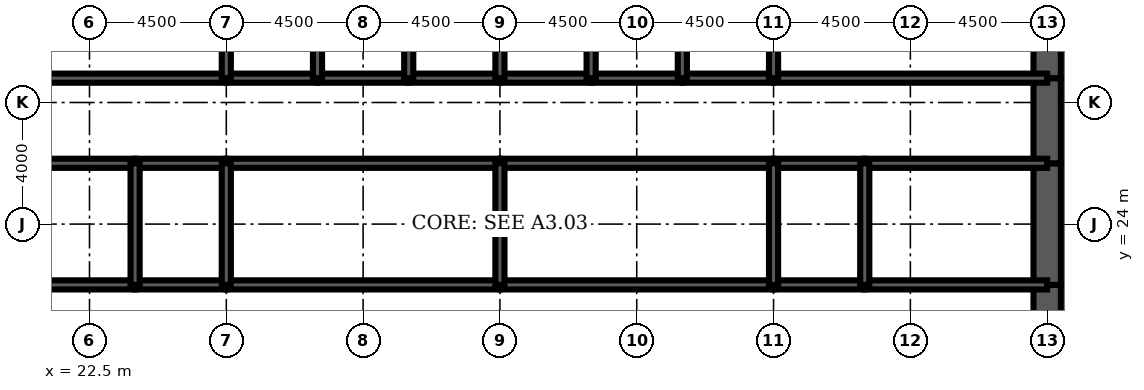
"""IFC4 building model, lengths in metres.
Left out: names, types, materials, properties, quantities, classifications, styles, units other than length and angle.
Written with IfcOpenShell. Run it as: python <this file> out.ifc"""

import sys

from ifc_helpers import new_model, si_unit, direction, frame, frame_2d, origin, place, context, subcontext, project, spatial, rectangle, extrude, element, fill, save


model = new_model("IFC4")
c1 = context("Model", 3, precision=1e-05, world=origin(), true_north=direction((0.0, 1.0)))
c2 = subcontext(c1, "Body", "Model", "MODEL_VIEW")
j1 = project(units=[si_unit("LENGTHUNIT", "METRE"), si_unit("PLANEANGLEUNIT", "RADIAN")], contexts=[c1])
p1 = place(None, origin())
s1 = spatial("IfcSite", under=j1, at=p1, CompositionType="ELEMENT")
p2 = place(p1, origin())
s2 = spatial("IfcBuilding", under=s1, at=p2, CompositionType="ELEMENT")
p3 = place(p2, frame((0.0, 0.0, 6.0)))
s3 = spatial("IfcBuildingStorey", under=s2, at=p3, CompositionType="ELEMENT", Elevation=6.0)
p4 = place(p3, frame((54.0, 19.2, 0.0), z_axis=(0.0, 0.0, 1.0), x_axis=(0.0, 1.0, 0.0)))
e1 = element("IfcWall", 1, at=p4, inside=s3, PredefinedType="SHEAR", context=c2, shape_type="SweptSolid", body=[
    extrude(rectangle(XDim=2.8, YDim=0.9, at=frame_2d((1.4, 0.0))), origin(), (0.0, 0.0, 1.0), 7.0),
])
p5 = place(p4, frame((0.4, 0.0, 0.0)))
e2 = element("IfcOpeningElement", 2, at=p5, cuts=e1, PredefinedType="OPENING", context=c2, shape_type="SweptSolid", body=[
    extrude(rectangle(XDim=1.8, YDim=2.1, at=frame_2d((0.9, 1.05))), frame((0.0, 0.46, 0.0), z_axis=(0.0, -1.0, 0.0), x_axis=(1.0, 0.0, 0.0)), (0.0, 0.0, 1.0), 0.92),
])
p6 = place(p3, frame((54.0, 22.0, 0.0), z_axis=(0.0, 0.0, 1.0), x_axis=(0.0, 1.0, 0.0)))
e3 = element("IfcWall", 3, at=p6, inside=s3, PredefinedType="SHEAR", context=c2, shape_type="SweptSolid", body=[
    extrude(rectangle(XDim=4.0, YDim=0.9, at=frame_2d((2.0, 0.0))), origin(), (0.0, 0.0, 1.0), 7.0),
])
p7 = place(p3, frame((54.0, 26.0, 0.0), z_axis=(0.0, 0.0, 1.0), x_axis=(0.0, 1.0, 0.0)))
e4 = element("IfcWall", 4, at=p7, inside=s3, PredefinedType="SHEAR", context=c2, shape_type="SweptSolid", body=[
    extrude(rectangle(XDim=2.8, YDim=0.9, at=frame_2d((1.4, 0.0))), origin(), (0.0, 0.0, 1.0), 7.0),
])
p8 = place(p7, frame((0.6, 0.0, 0.0)))
e5 = element("IfcOpeningElement", 5, at=p8, cuts=e4, PredefinedType="OPENING", context=c2, shape_type="SweptSolid", body=[
    extrude(rectangle(XDim=1.8, YDim=2.1, at=frame_2d((0.9, 1.05))), frame((0.0, 0.46, 0.0), z_axis=(0.0, -1.0, 0.0), x_axis=(1.0, 0.0, 0.0)), (0.0, 0.0, 1.0), 0.92),
])
p9 = place(p3, frame((54.0, 28.8, 0.0), z_axis=(0.0, 0.0, 1.0), x_axis=(0.0, 1.0, 0.0)))
e6 = element("IfcWall", 6, at=p9, inside=s3, PredefinedType="SHEAR", context=c2, shape_type="SweptSolid", body=[
    extrude(rectangle(XDim=3.2, YDim=0.9, at=frame_2d((1.6, 0.0))), origin(), (0.0, 0.0, 1.0), 7.0),
])
p10 = place(p3, frame((18.0, 28.8, 0.0), z_axis=(0.0, 0.0, 1.0), x_axis=(1.0, 0.0, 0.0)))
e7 = element("IfcWall", 7, at=p10, inside=s3, PredefinedType="SOLIDWALL", context=c2, shape_type="SweptSolid", body=[
    extrude(rectangle(XDim=9.0, YDim=0.3, at=frame_2d((4.5, 0.0))), origin(), (0.0, 0.0, 1.0), 7.0),
])
p11 = place(p10, frame((0.65, 0.0, 0.0)))
e8 = element("IfcOpeningElement", 8, at=p11, cuts=e7, PredefinedType="OPENING", context=c2, shape_type="SweptSolid", body=[
    extrude(rectangle(XDim=1.0, YDim=2.1, at=frame_2d((0.5, 1.05))), frame((0.0, 0.16, 0.0), z_axis=(0.0, -1.0, 0.0), x_axis=(1.0, 0.0, 0.0)), (0.0, 0.0, 1.0), 0.32),
])
p12 = place(p3, frame((27.0, 28.8, 0.0), z_axis=(0.0, 0.0, 1.0), x_axis=(1.0, 0.0, 0.0)))
e9 = element("IfcWall", 9, at=p12, inside=s3, PredefinedType="SOLIDWALL", context=c2, shape_type="SweptSolid", body=[
    extrude(rectangle(XDim=3.0, YDim=0.3, at=frame_2d((1.5, 0.0))), origin(), (0.0, 0.0, 1.0), 7.0),
])
p13 = place(p12, frame((0.95, 0.0, 0.0)))
e10 = element("IfcOpeningElement", 10, at=p13, cuts=e9, PredefinedType="OPENING", context=c2, shape_type="SweptSolid", body=[
    extrude(rectangle(XDim=1.1, YDim=2.2, at=frame_2d((0.55, 1.1))), frame((0.0, 0.16, 0.0), z_axis=(0.0, -1.0, 0.0), x_axis=(1.0, 0.0, 0.0)), (0.0, 0.0, 1.0), 0.32),
])
p14 = place(p3, frame((30.0, 28.8, 0.0), z_axis=(0.0, 0.0, 1.0), x_axis=(1.0, 0.0, 0.0)))
e11 = element("IfcWall", 11, at=p14, inside=s3, PredefinedType="SOLIDWALL", context=c2, shape_type="SweptSolid", body=[
    extrude(rectangle(XDim=3.0, YDim=0.3, at=frame_2d((1.5, 0.0))), origin(), (0.0, 0.0, 1.0), 7.0),
])
p15 = place(p14, frame((0.95, 0.0, 0.0)))
e12 = element("IfcOpeningElement", 12, at=p15, cuts=e11, PredefinedType="OPENING", context=c2, shape_type="SweptSolid", body=[
    extrude(rectangle(XDim=1.1, YDim=2.2, at=frame_2d((0.55, 1.1))), frame((0.0, 0.16, 0.0), z_axis=(0.0, -1.0, 0.0), x_axis=(1.0, 0.0, 0.0)), (0.0, 0.0, 1.0), 0.32),
])
p16 = place(p3, frame((33.0, 28.8, 0.0), z_axis=(0.0, 0.0, 1.0), x_axis=(1.0, 0.0, 0.0)))
e13 = element("IfcWall", 13, at=p16, inside=s3, PredefinedType="SOLIDWALL", context=c2, shape_type="SweptSolid", body=[
    extrude(rectangle(XDim=3.0, YDim=0.3, at=frame_2d((1.5, 0.0))), origin(), (0.0, 0.0, 1.0), 7.0),
])
p17 = place(p16, frame((0.95, 0.0, 0.0)))
e14 = element("IfcOpeningElement", 14, at=p17, cuts=e13, PredefinedType="OPENING", context=c2, shape_type="SweptSolid", body=[
    extrude(rectangle(XDim=1.1, YDim=2.2, at=frame_2d((0.55, 1.1))), frame((0.0, 0.16, 0.0), z_axis=(0.0, -1.0, 0.0), x_axis=(1.0, 0.0, 0.0)), (0.0, 0.0, 1.0), 0.32),
])
for number, where, z_axis, x_axis in (
    (15, (36.0, 28.8, 0.0), (0.0, 0.0, 1.0), (1.0, 0.0, 0.0)),
    (16, (39.0, 28.8, 0.0), (0.0, 0.0, 1.0), (1.0, 0.0, 0.0)),
):
    element("IfcWall", number, at=place(p3, frame(where, z_axis=z_axis, x_axis=x_axis)), inside=s3, PredefinedType="SOLIDWALL", context=c2, shape_type="SweptSolid", body=[
        extrude(rectangle(XDim=3.0, YDim=0.3, at=frame_2d((1.5, 0.0))), origin(), (0.0, 0.0, 1.0), 7.0),
    ])
p18 = place(p3, frame((42.0, 28.8, 0.0), z_axis=(0.0, 0.0, 1.0), x_axis=(1.0, 0.0, 0.0)))
e17 = element("IfcWall", 17, at=p18, inside=s3, PredefinedType="SOLIDWALL", context=c2, shape_type="SweptSolid", body=[
    extrude(rectangle(XDim=3.0, YDim=0.3, at=frame_2d((1.5, 0.0))), origin(), (0.0, 0.0, 1.0), 7.0),
])
p19 = place(p18, frame((0.95, 0.0, 0.0)))
e18 = element("IfcOpeningElement", 18, at=p19, cuts=e17, PredefinedType="OPENING", context=c2, shape_type="SweptSolid", body=[
    extrude(rectangle(XDim=1.1, YDim=2.2, at=frame_2d((0.55, 1.1))), frame((0.0, 0.16, 0.0), z_axis=(0.0, -1.0, 0.0), x_axis=(1.0, 0.0, 0.0)), (0.0, 0.0, 1.0), 0.32),
])
p20 = place(p3, frame((45.0, 28.8, 0.0), z_axis=(0.0, 0.0, 1.0), x_axis=(1.0, 0.0, 0.0)))
e19 = element("IfcWall", 19, at=p20, inside=s3, PredefinedType="SOLIDWALL", context=c2, shape_type="SweptSolid", body=[
    extrude(rectangle(XDim=9.0, YDim=0.3, at=frame_2d((4.5, 0.0))), origin(), (0.0, 0.0, 1.0), 7.0),
])
p21 = place(p20, frame((7.35, 0.0, 0.0)))
e20 = element("IfcOpeningElement", 20, at=p21, cuts=e19, PredefinedType="OPENING", context=c2, shape_type="SweptSolid", body=[
    extrude(rectangle(XDim=1.0, YDim=2.1, at=frame_2d((0.5, 1.05))), frame((0.0, 0.16, 0.0), z_axis=(0.0, -1.0, 0.0), x_axis=(1.0, 0.0, 0.0)), (0.0, 0.0, 1.0), 0.32),
])
p22 = place(p3, frame((18.0, 22.0, 0.0), z_axis=(0.0, 0.0, 1.0), x_axis=(1.0, 0.0, 0.0)))
e21 = element("IfcWall", 21, at=p22, inside=s3, PredefinedType="SOLIDWALL", context=c2, shape_type="SweptSolid", body=[
    extrude(rectangle(XDim=6.0, YDim=0.3, at=frame_2d((3.0, 0.0))), origin(), (0.0, 0.0, 1.0), 7.0),
])
p23 = place(p22, frame((4.4, 0.0, 0.0)))
e22 = element("IfcOpeningElement", 22, at=p23, cuts=e21, PredefinedType="OPENING", context=c2, shape_type="SweptSolid", body=[
    extrude(rectangle(XDim=1.0, YDim=2.1, at=frame_2d((0.5, 1.05))), frame((0.0, 0.16, 0.0), z_axis=(0.0, -1.0, 0.0), x_axis=(1.0, 0.0, 0.0)), (0.0, 0.0, 1.0), 0.32),
])
p24 = place(p22, frame((0.7, 0.0, 0.0)))
e23 = element("IfcOpeningElement", 23, at=p24, cuts=e21, PredefinedType="OPENING", context=c2, shape_type="SweptSolid", body=[
    extrude(rectangle(XDim=1.0, YDim=2.1, at=frame_2d((0.5, 1.05))), frame((0.0, 0.16, 0.0), z_axis=(0.0, -1.0, 0.0), x_axis=(1.0, 0.0, 0.0)), (0.0, 0.0, 1.0), 0.32),
])
p25 = place(p3, frame((24.0, 22.0, 0.0), z_axis=(0.0, 0.0, 1.0), x_axis=(1.0, 0.0, 0.0)))
e24 = element("IfcWall", 24, at=p25, inside=s3, PredefinedType="SOLIDWALL", context=c2, shape_type="SweptSolid", body=[
    extrude(rectangle(XDim=3.0, YDim=0.3, at=frame_2d((1.5, 0.0))), origin(), (0.0, 0.0, 1.0), 7.0),
])
p26 = place(p25, frame((1.0, 0.0, 0.0)))
e25 = element("IfcOpeningElement", 25, at=p26, cuts=e24, PredefinedType="OPENING", context=c2, shape_type="SweptSolid", body=[
    extrude(rectangle(XDim=1.0, YDim=2.1, at=frame_2d((0.5, 1.05))), frame((0.0, 0.16, 0.0), z_axis=(0.0, -1.0, 0.0), x_axis=(1.0, 0.0, 0.0)), (0.0, 0.0, 1.0), 0.32),
])
p27 = place(p3, frame((27.0, 22.0, 0.0), z_axis=(0.0, 0.0, 1.0), x_axis=(1.0, 0.0, 0.0)))
e26 = element("IfcWall", 26, at=p27, inside=s3, PredefinedType="SOLIDWALL", context=c2, shape_type="SweptSolid", body=[
    extrude(rectangle(XDim=9.0, YDim=0.3, at=frame_2d((4.5, 0.0))), origin(), (0.0, 0.0, 1.0), 7.0),
])
p28 = place(p27, frame((4.0, 0.0, 0.0)))
e27 = element("IfcOpeningElement", 27, at=p28, cuts=e26, PredefinedType="OPENING", context=c2, shape_type="SweptSolid", body=[
    extrude(rectangle(XDim=1.0, YDim=2.1, at=frame_2d((0.5, 1.05))), frame((0.0, 0.16, 0.0), z_axis=(0.0, -1.0, 0.0), x_axis=(1.0, 0.0, 0.0)), (0.0, 0.0, 1.0), 0.32),
])
p29 = place(p3, frame((36.0, 22.0, 0.0), z_axis=(0.0, 0.0, 1.0), x_axis=(1.0, 0.0, 0.0)))
e28 = element("IfcWall", 28, at=p29, inside=s3, PredefinedType="SOLIDWALL", context=c2, shape_type="SweptSolid", body=[
    extrude(rectangle(XDim=9.0, YDim=0.3, at=frame_2d((4.5, 0.0))), origin(), (0.0, 0.0, 1.0), 7.0),
])
p30 = place(p29, frame((4.0, 0.0, 0.0)))
e29 = element("IfcOpeningElement", 29, at=p30, cuts=e28, PredefinedType="OPENING", context=c2, shape_type="SweptSolid", body=[
    extrude(rectangle(XDim=1.0, YDim=2.1, at=frame_2d((0.5, 1.05))), frame((0.0, 0.16, 0.0), z_axis=(0.0, -1.0, 0.0), x_axis=(1.0, 0.0, 0.0)), (0.0, 0.0, 1.0), 0.32),
])
p31 = place(p3, frame((45.0, 22.0, 0.0), z_axis=(0.0, 0.0, 1.0), x_axis=(1.0, 0.0, 0.0)))
e30 = element("IfcWall", 30, at=p31, inside=s3, PredefinedType="SOLIDWALL", context=c2, shape_type="SweptSolid", body=[
    extrude(rectangle(XDim=3.0, YDim=0.3, at=frame_2d((1.5, 0.0))), origin(), (0.0, 0.0, 1.0), 7.0),
])
p32 = place(p31, frame((1.0, 0.0, 0.0)))
e31 = element("IfcOpeningElement", 31, at=p32, cuts=e30, PredefinedType="OPENING", context=c2, shape_type="SweptSolid", body=[
    extrude(rectangle(XDim=1.0, YDim=2.1, at=frame_2d((0.5, 1.05))), frame((0.0, 0.16, 0.0), z_axis=(0.0, -1.0, 0.0), x_axis=(1.0, 0.0, 0.0)), (0.0, 0.0, 1.0), 0.32),
])
p33 = place(p3, frame((48.0, 22.0, 0.0), z_axis=(0.0, 0.0, 1.0), x_axis=(1.0, 0.0, 0.0)))
e32 = element("IfcWall", 32, at=p33, inside=s3, PredefinedType="SOLIDWALL", context=c2, shape_type="SweptSolid", body=[
    extrude(rectangle(XDim=6.0, YDim=0.3, at=frame_2d((3.0, 0.0))), origin(), (0.0, 0.0, 1.0), 7.0),
])
p34 = place(p33, frame((2.0, 0.0, 0.0)))
e33 = element("IfcOpeningElement", 33, at=p34, cuts=e32, PredefinedType="OPENING", context=c2, shape_type="SweptSolid", body=[
    extrude(rectangle(XDim=1.0, YDim=2.1, at=frame_2d((0.5, 1.05))), frame((0.0, 0.16, 0.0), z_axis=(0.0, -1.0, 0.0), x_axis=(1.0, 0.0, 0.0)), (0.0, 0.0, 1.0), 0.32),
])
p35 = place(p33, frame((4.3, 0.0, 0.0)))
e34 = element("IfcOpeningElement", 34, at=p35, cuts=e32, PredefinedType="OPENING", context=c2, shape_type="SweptSolid", body=[
    extrude(rectangle(XDim=1.0, YDim=2.1, at=frame_2d((0.5, 1.05))), frame((0.0, 0.16, 0.0), z_axis=(0.0, -1.0, 0.0), x_axis=(1.0, 0.0, 0.0)), (0.0, 0.0, 1.0), 0.32),
])
p36 = place(p3, frame((18.0, 26.0, 0.0), z_axis=(0.0, 0.0, 1.0), x_axis=(1.0, 0.0, 0.0)))
e35 = element("IfcWall", 35, at=p36, inside=s3, PredefinedType="SOLIDWALL", context=c2, shape_type="SweptSolid", body=[
    extrude(rectangle(XDim=6.0, YDim=0.3, at=frame_2d((3.0, 0.0))), origin(), (0.0, 0.0, 1.0), 7.0),
])
p37 = place(p3, frame((24.0, 26.0, 0.0), z_axis=(0.0, 0.0, 1.0), x_axis=(1.0, 0.0, 0.0)))
e36 = element("IfcWall", 36, at=p37, inside=s3, PredefinedType="SOLIDWALL", context=c2, shape_type="SweptSolid", body=[
    extrude(rectangle(XDim=3.0, YDim=0.3, at=frame_2d((1.5, 0.0))), origin(), (0.0, 0.0, 1.0), 7.0),
])
for number, where, z_axis, x_axis in (
    (37, (27.0, 26.0, 0.0), (0.0, 0.0, 1.0), (1.0, 0.0, 0.0)),
    (38, (36.0, 26.0, 0.0), (0.0, 0.0, 1.0), (1.0, 0.0, 0.0)),
):
    element("IfcWall", number, at=place(p3, frame(where, z_axis=z_axis, x_axis=x_axis)), inside=s3, PredefinedType="SOLIDWALL", context=c2, shape_type="SweptSolid", body=[
        extrude(rectangle(XDim=9.0, YDim=0.3, at=frame_2d((4.5, 0.0))), origin(), (0.0, 0.0, 1.0), 7.0),
    ])
p38 = place(p3, frame((45.0, 26.0, 0.0), z_axis=(0.0, 0.0, 1.0), x_axis=(1.0, 0.0, 0.0)))
e39 = element("IfcWall", 39, at=p38, inside=s3, PredefinedType="SOLIDWALL", context=c2, shape_type="SweptSolid", body=[
    extrude(rectangle(XDim=3.0, YDim=0.3, at=frame_2d((1.5, 0.0))), origin(), (0.0, 0.0, 1.0), 7.0),
])
p39 = place(p3, frame((48.0, 26.0, 0.0), z_axis=(0.0, 0.0, 1.0), x_axis=(1.0, 0.0, 0.0)))
e40 = element("IfcWall", 40, at=p39, inside=s3, PredefinedType="SOLIDWALL", context=c2, shape_type="SweptSolid", body=[
    extrude(rectangle(XDim=6.0, YDim=0.3, at=frame_2d((3.0, 0.0))), origin(), (0.0, 0.0, 1.0), 7.0),
])
for number, where, z_axis, x_axis in (
    (41, (27.0, 28.8, 0.0), (0.0, 0.0, 1.0), (0.0, 1.0, 0.0)),
    (42, (30.0, 28.8, 0.0), (0.0, 0.0, 1.0), (0.0, 1.0, 0.0)),
    (43, (33.0, 28.8, 0.0), (0.0, 0.0, 1.0), (0.0, 1.0, 0.0)),
    (44, (36.0, 28.8, 0.0), (0.0, 0.0, 1.0), (0.0, 1.0, 0.0)),
    (45, (39.0, 28.8, 0.0), (0.0, 0.0, 1.0), (0.0, 1.0, 0.0)),
    (46, (42.0, 28.8, 0.0), (0.0, 0.0, 1.0), (0.0, 1.0, 0.0)),
    (47, (45.0, 28.8, 0.0), (0.0, 0.0, 1.0), (0.0, 1.0, 0.0)),
):
    element("IfcWall", number, at=place(p3, frame(where, z_axis=z_axis, x_axis=x_axis)), inside=s3, PredefinedType="SOLIDWALL", context=c2, shape_type="SweptSolid", body=[
        extrude(rectangle(XDim=3.2, YDim=0.3, at=frame_2d((1.6, 0.0))), origin(), (0.0, 0.0, 1.0), 7.0),
    ])
for number, where, z_axis, x_axis in (
    (48, (24.0, 22.0, 0.0), (0.0, 0.0, 1.0), (0.0, 1.0, 0.0)),
    (49, (27.0, 22.0, 0.0), (0.0, 0.0, 1.0), (0.0, 1.0, 0.0)),
    (50, (36.0, 22.0, 0.0), (0.0, 0.0, 1.0), (0.0, 1.0, 0.0)),
    (51, (45.0, 22.0, 0.0), (0.0, 0.0, 1.0), (0.0, 1.0, 0.0)),
    (52, (48.0, 22.0, 0.0), (0.0, 0.0, 1.0), (0.0, 1.0, 0.0)),
):
    element("IfcWall", number, at=place(p3, frame(where, z_axis=z_axis, x_axis=x_axis)), inside=s3, PredefinedType="SOLIDWALL", context=c2, shape_type="SweptSolid", body=[
        extrude(rectangle(XDim=4.0, YDim=0.3, at=frame_2d((2.0, 0.0))), origin(), (0.0, 0.0, 1.0), 7.0),
    ])
p40 = place(p3, frame((38.5, 22.15, 0.0), z_axis=(0.0, 0.0, 1.0), x_axis=(0.0, 1.0, 0.0)))
e53 = element("IfcWall", 53, at=p40, inside=s3, PredefinedType="PARTITIONING", context=c2, shape_type="SweptSolid", body=[
    extrude(rectangle(XDim=3.7, YDim=0.15, at=frame_2d((1.85, 0.0))), origin(), (0.0, 0.0, 1.0), 3.0),
])
p41 = place(p40, frame((2.2, 0.0, 0.0)))
e54 = element("IfcOpeningElement", 54, at=p41, cuts=e53, PredefinedType="OPENING", context=c2, shape_type="SweptSolid", body=[
    extrude(rectangle(XDim=1.0, YDim=2.1, at=frame_2d((0.5, 1.05))), frame((0.0, 0.085, 0.0), z_axis=(0.0, -1.0, 0.0), x_axis=(1.0, 0.0, 0.0)), (0.0, 0.0, 1.0), 0.17),
])
p42 = place(p3, frame((51.975, 22.15, 0.0), z_axis=(0.0, 0.0, 1.0), x_axis=(0.0, 1.0, 0.0)))
e55 = element("IfcWall", 55, at=p42, inside=s3, PredefinedType="PARTITIONING", context=c2, shape_type="SweptSolid", body=[
    extrude(rectangle(XDim=3.7, YDim=0.15, at=frame_2d((1.85, 0.0))), origin(), (0.0, 0.0, 1.0), 3.0),
])
p43 = place(p3, frame((22.2, 26.15, 0.0), z_axis=(0.0, 0.0, 1.0), x_axis=(0.0, 1.0, 0.0)))
e56 = element("IfcWall", 56, at=p43, inside=s3, PredefinedType="PARTITIONING", context=c2, shape_type="SweptSolid", body=[
    extrude(rectangle(XDim=2.5, YDim=0.15, at=frame_2d((1.25, 0.0))), origin(), (0.0, 0.0, 1.0), 3.0),
])
p44 = place(p43, frame((0.35, 0.0, 0.0)))
e57 = element("IfcOpeningElement", 57, at=p44, cuts=e56, PredefinedType="OPENING", context=c2, shape_type="SweptSolid", body=[
    extrude(rectangle(XDim=1.0, YDim=2.1, at=frame_2d((0.5, 1.05))), frame((0.0, 0.085, 0.0), z_axis=(0.0, -1.0, 0.0), x_axis=(1.0, 0.0, 0.0)), (0.0, 0.0, 1.0), 0.17),
])
p45 = place(p41, origin())
e58 = element("IfcDoor", 58, at=p45, inside=s3, OperationType="SINGLE_SWING_RIGHT", PredefinedType="DOOR", context=c2, shape_type="SweptSolid", body=[
    extrude(rectangle(XDim=1.0, YDim=2.1, at=frame_2d((0.5, 1.05))), frame((0.0, 0.025, 0.0), z_axis=(0.0, -1.0, 0.0), x_axis=(1.0, 0.0, 0.0)), (0.0, 0.0, 1.0), 0.05),
])
fill(e54, e58)
p46 = place(p44, origin())
e59 = element("IfcDoor", 59, at=p46, inside=s3, OperationType="SINGLE_SWING_LEFT", PredefinedType="DOOR", context=c2, shape_type="SweptSolid", body=[
    extrude(rectangle(XDim=1.0, YDim=2.1, at=frame_2d((0.5, 1.05))), frame((0.0, 0.025, 0.0), z_axis=(0.0, -1.0, 0.0), x_axis=(1.0, 0.0, 0.0)), (0.0, 0.0, 1.0), 0.05),
])
fill(e57, e59)
p47 = place(p19, origin())
e60 = element("IfcDoor", 60, at=p47, inside=s3, OperationType="DOUBLE_DOOR_SLIDING", PredefinedType="USERDEFINED", context=c2, shape_type="SweptSolid", body=[
    extrude(rectangle(XDim=1.1, YDim=2.2, at=frame_2d((0.55, 1.1))), frame((0.0, 0.025, 0.0), z_axis=(0.0, -1.0, 0.0), x_axis=(1.0, 0.0, 0.0)), (0.0, 0.0, 1.0), 0.05),
])
fill(e18, e60)
p48 = place(p13, origin())
e61 = element("IfcDoor", 61, at=p48, inside=s3, OperationType="DOUBLE_DOOR_SLIDING", PredefinedType="USERDEFINED", context=c2, shape_type="SweptSolid", body=[
    extrude(rectangle(XDim=1.1, YDim=2.2, at=frame_2d((0.55, 1.1))), frame((0.0, 0.025, 0.0), z_axis=(0.0, -1.0, 0.0), x_axis=(1.0, 0.0, 0.0)), (0.0, 0.0, 1.0), 0.05),
])
fill(e10, e61)
p49 = place(p15, origin())
e62 = element("IfcDoor", 62, at=p49, inside=s3, OperationType="DOUBLE_DOOR_SLIDING", PredefinedType="USERDEFINED", context=c2, shape_type="SweptSolid", body=[
    extrude(rectangle(XDim=1.1, YDim=2.2, at=frame_2d((0.55, 1.1))), frame((0.0, 0.025, 0.0), z_axis=(0.0, -1.0, 0.0), x_axis=(1.0, 0.0, 0.0)), (0.0, 0.0, 1.0), 0.05),
])
fill(e12, e62)
p50 = place(p17, origin())
e63 = element("IfcDoor", 63, at=p50, inside=s3, OperationType="DOUBLE_DOOR_SLIDING", PredefinedType="USERDEFINED", context=c2, shape_type="SweptSolid", body=[
    extrude(rectangle(XDim=1.1, YDim=2.2, at=frame_2d((0.55, 1.1))), frame((0.0, 0.025, 0.0), z_axis=(0.0, -1.0, 0.0), x_axis=(1.0, 0.0, 0.0)), (0.0, 0.0, 1.0), 0.05),
])
fill(e14, e63)
p51 = place(p21, origin())
e64 = element("IfcDoor", 64, at=p51, inside=s3, OperationType="SINGLE_SWING_RIGHT", PredefinedType="DOOR", context=c2, shape_type="SweptSolid", body=[
    extrude(rectangle(XDim=1.0, YDim=2.1, at=frame_2d((0.5, 1.05))), frame((0.0, 0.025, 0.0), z_axis=(0.0, -1.0, 0.0), x_axis=(1.0, 0.0, 0.0)), (0.0, 0.0, 1.0), 0.05),
])
fill(e20, e64)
p52 = place(p5, origin())
e65 = element("IfcDoor", 65, at=p52, inside=s3, OperationType="SINGLE_SWING_LEFT", PredefinedType="DOOR", context=c2, shape_type="SweptSolid", body=[
    extrude(rectangle(XDim=1.8, YDim=2.1, at=frame_2d((0.9, 1.05))), frame((0.0, 0.45, 0.0), z_axis=(0.0, -1.0, 0.0), x_axis=(1.0, 0.0, 0.0)), (0.0, 0.0, 1.0), 0.899),
])
fill(e2, e65)
p53 = place(p8, origin())
e66 = element("IfcDoor", 66, at=p53, inside=s3, OperationType="SINGLE_SWING_LEFT", PredefinedType="DOOR", context=c2, shape_type="SweptSolid", body=[
    extrude(rectangle(XDim=1.8, YDim=2.1, at=frame_2d((0.9, 1.05))), frame((0.0, 0.45, 0.0), z_axis=(0.0, -1.0, 0.0), x_axis=(1.0, 0.0, 0.0)), (0.0, 0.0, 1.0), 0.899),
])
fill(e5, e66)
p54 = place(p23, origin())
e67 = element("IfcDoor", 67, at=p54, inside=s3, OperationType="SINGLE_SWING_RIGHT", PredefinedType="DOOR", context=c2, shape_type="SweptSolid", body=[
    extrude(rectangle(XDim=1.0, YDim=2.1, at=frame_2d((0.5, 1.05))), frame((0.0, 0.025, 0.0), z_axis=(0.0, -1.0, 0.0), x_axis=(1.0, 0.0, 0.0)), (0.0, 0.0, 1.0), 0.05),
])
fill(e22, e67)
p55 = place(p26, origin())
e68 = element("IfcDoor", 68, at=p55, inside=s3, OperationType="SINGLE_SWING_LEFT", PredefinedType="DOOR", context=c2, shape_type="SweptSolid", body=[
    extrude(rectangle(XDim=1.0, YDim=2.1, at=frame_2d((0.5, 1.05))), frame((0.0, 0.025, 0.0), z_axis=(0.0, -1.0, 0.0), x_axis=(1.0, 0.0, 0.0)), (0.0, 0.0, 1.0), 0.05),
])
fill(e25, e68)
p56 = place(p28, origin())
e69 = element("IfcDoor", 69, at=p56, inside=s3, OperationType="SINGLE_SWING_LEFT", PredefinedType="DOOR", context=c2, shape_type="SweptSolid", body=[
    extrude(rectangle(XDim=1.0, YDim=2.1, at=frame_2d((0.5, 1.05))), frame((0.0, 0.025, 0.0), z_axis=(0.0, -1.0, 0.0), x_axis=(1.0, 0.0, 0.0)), (0.0, 0.0, 1.0), 0.05),
])
fill(e27, e69)
p57 = place(p30, origin())
e70 = element("IfcDoor", 70, at=p57, inside=s3, OperationType="SINGLE_SWING_LEFT", PredefinedType="DOOR", context=c2, shape_type="SweptSolid", body=[
    extrude(rectangle(XDim=1.0, YDim=2.1, at=frame_2d((0.5, 1.05))), frame((0.0, 0.025, 0.0), z_axis=(0.0, -1.0, 0.0), x_axis=(1.0, 0.0, 0.0)), (0.0, 0.0, 1.0), 0.05),
])
fill(e29, e70)
p58 = place(p32, origin())
e71 = element("IfcDoor", 71, at=p58, inside=s3, OperationType="SINGLE_SWING_LEFT", PredefinedType="DOOR", context=c2, shape_type="SweptSolid", body=[
    extrude(rectangle(XDim=1.0, YDim=2.1, at=frame_2d((0.5, 1.05))), frame((0.0, 0.025, 0.0), z_axis=(0.0, -1.0, 0.0), x_axis=(1.0, 0.0, 0.0)), (0.0, 0.0, 1.0), 0.05),
])
fill(e31, e71)
p59 = place(p34, origin())
e72 = element("IfcDoor", 72, at=p59, inside=s3, OperationType="SINGLE_SWING_LEFT", PredefinedType="DOOR", context=c2, shape_type="SweptSolid", body=[
    extrude(rectangle(XDim=1.0, YDim=2.1, at=frame_2d((0.5, 1.05))), frame((0.0, 0.025, 0.0), z_axis=(0.0, -1.0, 0.0), x_axis=(1.0, 0.0, 0.0)), (0.0, 0.0, 1.0), 0.05),
])
fill(e33, e72)
p60 = place(p35, origin())
e73 = element("IfcDoor", 73, at=p60, inside=s3, OperationType="SINGLE_SWING_RIGHT", PredefinedType="DOOR", context=c2, shape_type="SweptSolid", body=[
    extrude(rectangle(XDim=1.0, YDim=2.1, at=frame_2d((0.5, 1.05))), frame((0.0, 0.025, 0.0), z_axis=(0.0, -1.0, 0.0), x_axis=(1.0, 0.0, 0.0)), (0.0, 0.0, 1.0), 0.05),
])
fill(e34, e73)
save(model, sys.argv[1])
